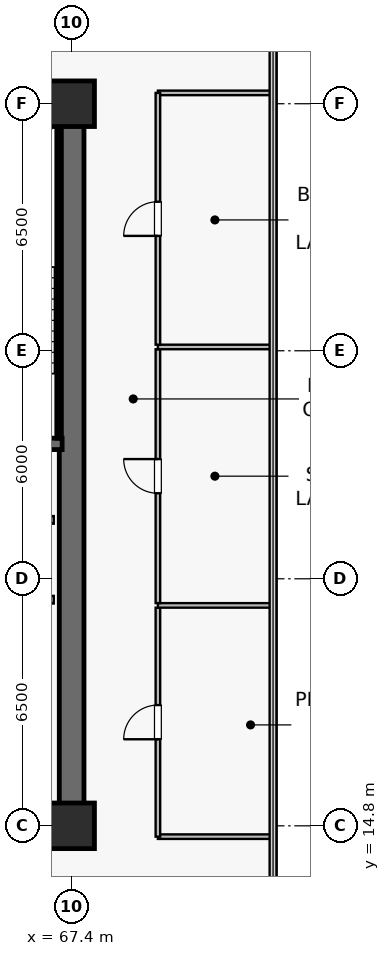
"""IFC4 building model, lengths in metres.
Left out: names, types, materials, properties, quantities, classifications, styles, units other than length and angle.
Written with IfcOpenShell. Run it as: python <this file> out.ifc"""

import sys

from ifc_helpers import new_model, si_unit, direction, frame, frame_2d, origin, origin_2d, place, context, subcontext, project, spatial, rectangle, extrude, source, transform, mapped, element, fill, save


model = new_model("IFC4")
c1 = context("Model", 3, precision=1e-05, world=origin(), true_north=direction((0.0, 1.0)))
c2 = subcontext(c1, "Body", "Model", "MODEL_VIEW")
j1 = project(units=[si_unit("LENGTHUNIT", "METRE"), si_unit("PLANEANGLEUNIT", "RADIAN")], contexts=[c1])
p1 = place(None, origin())
s1 = spatial("IfcSite", under=j1, at=p1, CompositionType="ELEMENT")
p2 = place(p1, origin())
s2 = spatial("IfcBuilding", under=s1, at=p2, CompositionType="ELEMENT")
p3 = place(p2, frame((0.0, 0.0, 121.5)))
s3 = spatial("IfcBuildingStorey", under=s2, at=p3, CompositionType="ELEMENT", Elevation=121.5)
p4 = place(p3, frame((52.275, 14.8, 0.0), z_axis=(0.0, 0.0, 1.0), x_axis=(1.0, 0.0, 0.0)))
e1 = element("IfcWall", 1, at=p4, inside=s3, PredefinedType="SHEAR", context=c2, shape_type="SweptSolid", body=[
    extrude(rectangle(XDim=15.45, YDim=0.65, at=frame_2d((7.725, 0.0))), origin(), (0.0, 0.0, 1.0), 3.79),
])
p5 = place(p3, frame((52.275, 33.8, 0.0), z_axis=(0.0, 0.0, 1.0), x_axis=(1.0, 0.0, 0.0)))
e2 = element("IfcWall", 2, at=p5, inside=s3, PredefinedType="SHEAR", context=c2, shape_type="SweptSolid", body=[
    extrude(rectangle(XDim=15.45, YDim=0.65, at=frame_2d((7.725, 0.0))), origin(), (0.0, 0.0, 1.0), 3.79),
])
p6 = place(p5, frame((9.25, 0.0, 0.0)))
e3 = element("IfcOpeningElement", 3, at=p6, cuts=e2, PredefinedType="OPENING", context=c2, shape_type="SweptSolid", body=[
    extrude(rectangle(XDim=0.95, YDim=2.15, at=frame_2d((0.475, 1.075))), frame((0.0, 0.335, 0.0), z_axis=(0.0, -1.0, 0.0), x_axis=(1.0, 0.0, 0.0)), (0.0, 0.0, 1.0), 0.67),
])
p7 = place(p5, frame((6.735, 0.0, 0.0)))
e4 = element("IfcOpeningElement", 4, at=p7, cuts=e2, PredefinedType="OPENING", context=c2, shape_type="SweptSolid", body=[
    extrude(rectangle(XDim=0.95, YDim=2.15, at=frame_2d((0.475, 1.075))), frame((0.0, 0.335, 0.0), z_axis=(0.0, -1.0, 0.0), x_axis=(1.0, 0.0, 0.0)), (0.0, 0.0, 1.0), 0.67),
])
p8 = place(p5, frame((4.185, 0.0, 0.0)))
e5 = element("IfcOpeningElement", 5, at=p8, cuts=e2, PredefinedType="OPENING", context=c2, shape_type="SweptSolid", body=[
    extrude(rectangle(XDim=0.95, YDim=2.15, at=frame_2d((0.475, 1.075))), frame((0.0, 0.335, 0.0), z_axis=(0.0, -1.0, 0.0), x_axis=(1.0, 0.0, 0.0)), (0.0, 0.0, 1.0), 0.67),
])
p9 = place(p5, frame((1.635, 0.0, 0.0)))
e6 = element("IfcOpeningElement", 6, at=p9, cuts=e2, PredefinedType="OPENING", context=c2, shape_type="SweptSolid", body=[
    extrude(rectangle(XDim=0.95, YDim=2.15, at=frame_2d((0.475, 1.075))), frame((0.0, 0.335, 0.0), z_axis=(0.0, -1.0, 0.0), x_axis=(1.0, 0.0, 0.0)), (0.0, 0.0, 1.0), 0.67),
])
p10 = place(p3, frame((67.4, 15.125, 0.0), z_axis=(0.0, 0.0, 1.0), x_axis=(0.0, 1.0, 0.0)))
e7 = element("IfcWall", 7, at=p10, inside=s3, PredefinedType="SHEAR", context=c2, shape_type="SweptSolid", body=[
    extrude(rectangle(XDim=18.35, YDim=0.65, at=frame_2d((9.175, 0.0))), origin(), (0.0, 0.0, 1.0), 3.79),
])
p11 = place(p3, frame((63.35, 24.85, 0.0), z_axis=(0.0, 0.0, 1.0), x_axis=(1.0, 0.0, 0.0)))
e8 = element("IfcWall", 8, at=p11, inside=s3, PredefinedType="SHEAR", context=c2, shape_type="SweptSolid", body=[
    extrude(rectangle(XDim=3.8, YDim=0.3, at=frame_2d((1.9, 0.0))), origin(), (0.0, 0.0, 1.0), 3.79),
])
p12 = place(p3, frame((63.35, 33.4, 0.0), z_axis=(0.0, 0.0, 1.0), x_axis=(1.0, 0.0, 0.0)))
e9 = element("IfcWall", 9, at=p12, inside=s3, PredefinedType="SOLIDWALL", context=c2, shape_type="SweptSolid", body=[
    extrude(rectangle(XDim=3.72, YDim=0.12, at=frame_2d((1.86, 0.0))), origin(), (0.0, 0.0, 1.0), 3.79),
])
p13 = place(p3, frame((67.07, 25.0, 0.0), z_axis=(0.0, 0.0, 1.0), x_axis=(0.0, 1.0, 0.0)))
e10 = element("IfcWall", 10, at=p13, inside=s3, PredefinedType="SOLIDWALL", context=c2, shape_type="SweptSolid", body=[
    extrude(rectangle(XDim=8.32, YDim=0.12, at=frame_2d((4.16, 0.0))), origin(), (0.0, 0.0, 1.0), 3.79),
])
m1 = source(origin(), c2, "Body", "SweptSolid", [
    extrude(rectangle(XDim=1.2, YDim=1.2, at=origin_2d()), origin(), (0.0, 0.0, 1.0), 4.1),
])
for number, where, z_axis, x_axis in (
    (11, (67.4, 14.8, 0.0), (0.0, 0.0, 1.0), (1.0, 0.0, 0.0)),
    (12, (67.4, 33.8, 0.0), (0.0, 0.0, 1.0), (1.0, 0.0, 0.0)),
):
    element("IfcColumn", number, at=place(p3, frame(where, z_axis=z_axis, x_axis=x_axis)), inside=s3, PredefinedType="COLUMN", context=c2, shape_type="MappedRepresentation", body=[
        mapped(m1, transform((0.0, 0.0, 0.0), scale=1.0)),
    ])
for number, where, z_axis, x_axis in (
    (13, (64.67, 20.75, 0.0), (0.0, 0.0, 1.0), (1.0, 0.0, 0.0)),
    (14, (64.67, 22.85, 0.0), (0.0, 0.0, 1.0), (1.0, 0.0, 0.0)),
):
    element("IfcWall", number, at=place(p3, frame(where, z_axis=z_axis, x_axis=x_axis)), inside=s3, PredefinedType="SOLIDWALL", context=c2, shape_type="SweptSolid", body=[
        extrude(rectangle(XDim=2.26, YDim=0.2, at=frame_2d((1.13, 0.0))), origin(), (0.0, 0.0, 1.0), 3.79),
    ])
for number, where, z_axis, x_axis in (
    (15, (69.67, 14.515, 0.0), (0.0, 0.0, 1.0), (1.0, 0.0, 0.0)),
    (16, (69.67, 34.085, 0.0), (0.0, 0.0, 1.0), (1.0, 0.0, 0.0)),
):
    element("IfcWall", number, at=place(p3, frame(where, z_axis=z_axis, x_axis=x_axis)), inside=s3, PredefinedType="PARTITIONING", context=c2, shape_type="SweptSolid", body=[
        extrude(rectangle(XDim=3.02, YDim=0.12, at=frame_2d((1.51, 0.0))), origin(), (0.0, 0.0, 1.0), 3.79),
    ])
p14 = place(p3, frame((69.67, 14.515, 0.0), z_axis=(0.0, 0.0, 1.0), x_axis=(0.0, 1.0, 0.0)))
e17 = element("IfcWall", 17, at=p14, inside=s3, PredefinedType="PARTITIONING", context=c2, shape_type="SweptSolid", body=[
    extrude(rectangle(XDim=6.025, YDim=0.12, at=frame_2d((3.013, 0.0))), origin(), (0.0, 0.0, 1.0), 3.79),
])
p15 = place(p14, frame((2.562, 0.0, 0.0)))
e18 = element("IfcOpeningElement", 18, at=p15, cuts=e17, PredefinedType="OPENING", context=c2, shape_type="SweptSolid", body=[
    extrude(rectangle(XDim=0.9, YDim=2.1, at=frame_2d((0.45, 1.05))), frame((0.0, 0.07, 0.0), z_axis=(0.0, -1.0, 0.0), x_axis=(1.0, 0.0, 0.0)), (0.0, 0.0, 1.0), 0.14),
])
p16 = place(p3, frame((69.67, 20.6, 0.0), z_axis=(0.0, 0.0, 1.0), x_axis=(1.0, 0.0, 0.0)))
e19 = element("IfcWall", 19, at=p16, inside=s3, PredefinedType="PARTITIONING", context=c2, shape_type="SweptSolid", body=[
    extrude(rectangle(XDim=3.02, YDim=0.12, at=frame_2d((1.51, 0.0))), origin(), (0.0, 0.0, 1.0), 3.79),
])
p17 = place(p3, frame((69.67, 20.66, 0.0), z_axis=(0.0, 0.0, 1.0), x_axis=(0.0, 1.0, 0.0)))
e20 = element("IfcWall", 20, at=p17, inside=s3, PredefinedType="PARTITIONING", context=c2, shape_type="SweptSolid", body=[
    extrude(rectangle(XDim=6.68, YDim=0.12, at=frame_2d((3.34, 0.0))), origin(), (0.0, 0.0, 1.0), 3.79),
])
p18 = place(p17, frame((2.89, 0.0, 0.0)))
e21 = element("IfcOpeningElement", 21, at=p18, cuts=e20, PredefinedType="OPENING", context=c2, shape_type="SweptSolid", body=[
    extrude(rectangle(XDim=0.9, YDim=2.1, at=frame_2d((0.45, 1.05))), frame((0.0, 0.07, 0.0), z_axis=(0.0, -1.0, 0.0), x_axis=(1.0, 0.0, 0.0)), (0.0, 0.0, 1.0), 0.14),
])
p19 = place(p3, frame((69.67, 27.4, 0.0), z_axis=(0.0, 0.0, 1.0), x_axis=(1.0, 0.0, 0.0)))
e22 = element("IfcWall", 22, at=p19, inside=s3, PredefinedType="PARTITIONING", context=c2, shape_type="SweptSolid", body=[
    extrude(rectangle(XDim=3.02, YDim=0.12, at=frame_2d((1.51, 0.0))), origin(), (0.0, 0.0, 1.0), 3.79),
])
p20 = place(p3, frame((69.67, 27.46, 0.0), z_axis=(0.0, 0.0, 1.0), x_axis=(0.0, 1.0, 0.0)))
e23 = element("IfcWall", 23, at=p20, inside=s3, PredefinedType="PARTITIONING", context=c2, shape_type="SweptSolid", body=[
    extrude(rectangle(XDim=6.625, YDim=0.12, at=frame_2d((3.312, 0.0))), origin(), (0.0, 0.0, 1.0), 3.79),
])
p21 = place(p20, frame((2.863, 0.0, 0.0)))
e24 = element("IfcOpeningElement", 24, at=p21, cuts=e23, PredefinedType="OPENING", context=c2, shape_type="SweptSolid", body=[
    extrude(rectangle(XDim=0.9, YDim=2.1, at=frame_2d((0.45, 1.05))), frame((0.0, 0.07, 0.0), z_axis=(0.0, -1.0, 0.0), x_axis=(1.0, 0.0, 0.0)), (0.0, 0.0, 1.0), 0.14),
])
m2 = source(origin(), c2, "Body", "SweptSolid", [
    extrude(rectangle(XDim=0.9, YDim=2.1, at=frame_2d((0.45, 1.05))), frame((0.0, 0.025, 0.0), z_axis=(0.0, -1.0, 0.0), x_axis=(1.0, 0.0, 0.0)), (0.0, 0.0, 1.0), 0.05),
])
p22 = place(p15, origin())
e25 = element("IfcDoor", 25, at=p22, inside=s3, OperationType="SINGLE_SWING_LEFT", PredefinedType="DOOR", context=c2, shape_type="MappedRepresentation", body=[
    mapped(m2, transform((0.0, 0.0, 0.0), scale=1.0)),
])
fill(e18, e25)
p23 = place(p18, origin())
e26 = element("IfcDoor", 26, at=p23, inside=s3, OperationType="SINGLE_SWING_RIGHT", PredefinedType="DOOR", context=c2, shape_type="MappedRepresentation", body=[
    mapped(m2, transform((0.0, 0.0, 0.0), scale=1.0)),
])
fill(e21, e26)
p24 = place(p21, origin())
e27 = element("IfcDoor", 27, at=p24, inside=s3, OperationType="SINGLE_SWING_LEFT", PredefinedType="DOOR", context=c2, shape_type="MappedRepresentation", body=[
    mapped(m2, transform((0.0, 0.0, 0.0), scale=1.0)),
])
fill(e24, e27)
save(model, sys.argv[1])
